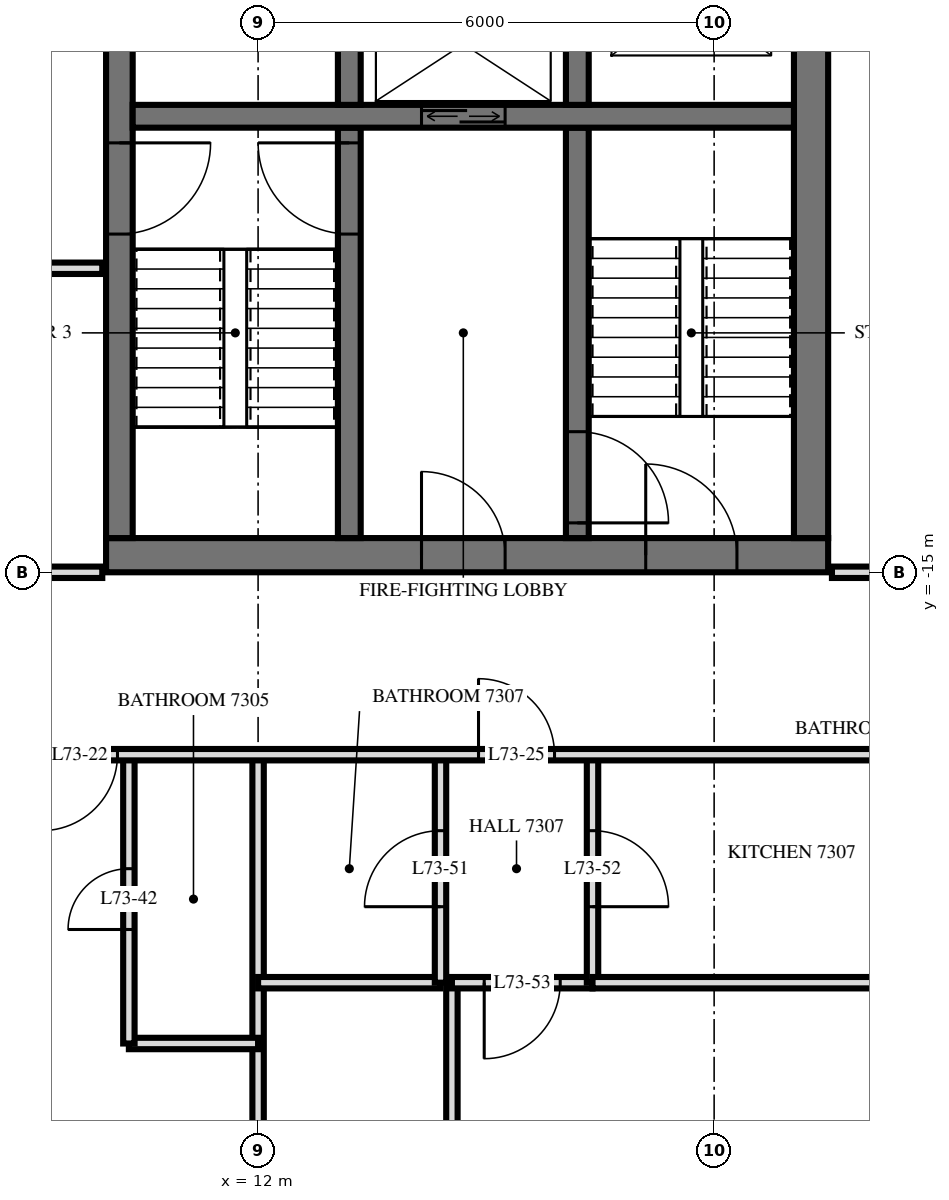
"""IFC4 building model, lengths in metres.
Left out: names, types, materials, properties, quantities, classifications, styles, units other than length and angle.
Written with IfcOpenShell. Run it as: python <this file> out.ifc"""

import sys

from ifc_helpers import new_model, si_unit, direction, frame, frame_2d, origin, place, context, subcontext, project, spatial, rectangle, extrude, element, fill, save


model = new_model("IFC4")
c1 = context("Model", 3, precision=1e-05, world=origin(), true_north=direction((0.0, 1.0)))
c2 = subcontext(c1, "Body", "Model", "MODEL_VIEW")
j1 = project(units=[si_unit("LENGTHUNIT", "METRE"), si_unit("PLANEANGLEUNIT", "RADIAN")], contexts=[c1])
p1 = place(None, origin())
s1 = spatial("IfcSite", under=j1, at=p1, CompositionType="ELEMENT")
p2 = place(p1, origin())
s2 = spatial("IfcBuilding", under=s1, at=p2, CompositionType="ELEMENT")
p3 = place(p2, frame((0.0, 0.0, 277.1)))
s3 = spatial("IfcBuildingStorey", under=s2, at=p3, CompositionType="ELEMENT", Elevation=277.1)
p4 = place(p3, frame((10.0, -14.775, 0.0), z_axis=(0.0, 0.0, 1.0), x_axis=(1.0, 0.0, 0.0)))
e1 = element("IfcWall", 1, at=p4, inside=s3, PredefinedType="SHEAR", context=c2, shape_type="SweptSolid", body=[
    extrude(rectangle(XDim=9.5, YDim=0.45, at=frame_2d((4.75, 0.0))), origin(), (0.0, 0.0, 1.0), 3.5),
])
p5 = place(p4, frame((7.1, 0.0, 0.0)))
e2 = element("IfcOpeningElement", 2, at=p5, cuts=e1, PredefinedType="OPENING", context=c2, shape_type="SweptSolid", body=[
    extrude(rectangle(XDim=1.2, YDim=2.1, at=frame_2d((0.6, 1.05))), frame((0.0, 0.235, 0.0), z_axis=(0.0, -1.0, 0.0), x_axis=(1.0, 0.0, 0.0)), (0.0, 0.0, 1.0), 0.47),
])
p6 = place(p4, frame((4.15, 0.0, 0.0)))
e3 = element("IfcOpeningElement", 3, at=p6, cuts=e1, PredefinedType="OPENING", context=c2, shape_type="SweptSolid", body=[
    extrude(rectangle(XDim=1.1, YDim=2.1, at=frame_2d((0.55, 1.05))), frame((0.0, 0.235, 0.0), z_axis=(0.0, -1.0, 0.0), x_axis=(1.0, 0.0, 0.0)), (0.0, 0.0, 1.0), 0.47),
])
p7 = place(p3, frame((10.175, -14.55, 0.0), z_axis=(0.0, 0.0, 1.0), x_axis=(0.0, 1.0, 0.0)))
e4 = element("IfcWall", 4, at=p7, inside=s3, PredefinedType="SHEAR", context=c2, shape_type="SweptSolid", body=[
    extrude(rectangle(XDim=14.1, YDim=0.35, at=frame_2d((7.05, 0.0))), origin(), (0.0, 0.0, 1.0), 3.5),
])
p8 = place(p7, frame((8.4, 0.0, 0.0)))
e5 = element("IfcOpeningElement", 5, at=p8, cuts=e4, PredefinedType="OPENING", context=c2, shape_type="SweptSolid", body=[
    extrude(rectangle(XDim=1.4, YDim=2.4, at=frame_2d((0.7, 1.2))), frame((0.0, 0.185, 0.0), z_axis=(0.0, -1.0, 0.0), x_axis=(1.0, 0.0, 0.0)), (0.0, 0.0, 1.0), 0.37),
])
p9 = place(p7, frame((10.0, 0.0, 0.0)))
e6 = element("IfcOpeningElement", 6, at=p9, cuts=e4, PredefinedType="OPENING", context=c2, shape_type="SweptSolid", body=[
    extrude(rectangle(XDim=1.4, YDim=2.4, at=frame_2d((0.7, 1.2))), frame((0.0, 0.185, 0.0), z_axis=(0.0, -1.0, 0.0), x_axis=(1.0, 0.0, 0.0)), (0.0, 0.0, 1.0), 0.37),
])
p10 = place(p7, frame((4.0, 0.0, 0.0)))
e7 = element("IfcOpeningElement", 7, at=p10, cuts=e4, PredefinedType="OPENING", context=c2, shape_type="SweptSolid", body=[
    extrude(rectangle(XDim=1.2, YDim=2.1, at=frame_2d((0.6, 1.05))), frame((0.0, 0.185, 0.0), z_axis=(0.0, -1.0, 0.0), x_axis=(1.0, 0.0, 0.0)), (0.0, 0.0, 1.0), 0.37),
])
p11 = place(p3, frame((19.275, -14.55, 0.0), z_axis=(0.0, 0.0, 1.0), x_axis=(0.0, 1.0, 0.0)))
e8 = element("IfcWall", 8, at=p11, inside=s3, PredefinedType="SHEAR", context=c2, shape_type="SweptSolid", body=[
    extrude(rectangle(XDim=14.1, YDim=0.45, at=frame_2d((7.05, 0.0))), origin(), (0.0, 0.0, 1.0), 3.5),
])
p12 = place(p3, frame((10.35, -9.0, 0.0), z_axis=(0.0, 0.0, 1.0), x_axis=(1.0, 0.0, 0.0)))
e9 = element("IfcWall", 9, at=p12, inside=s3, PredefinedType="SHEAR", context=c2, shape_type="SweptSolid", body=[
    extrude(rectangle(XDim=8.7, YDim=0.3, at=frame_2d((4.35, 0.0))), origin(), (0.0, 0.0, 1.0), 3.5),
])
p13 = place(p12, frame((3.8, 0.0, 0.0)))
e10 = element("IfcOpeningElement", 10, at=p13, cuts=e9, PredefinedType="OPENING", context=c2, shape_type="SweptSolid", body=[
    extrude(rectangle(XDim=1.1, YDim=2.1, at=frame_2d((0.55, 1.05))), frame((0.0, 0.16, 0.0), z_axis=(0.0, -1.0, 0.0), x_axis=(1.0, 0.0, 0.0)), (0.0, 0.0, 1.0), 0.32),
])
p14 = place(p3, frame((13.2, -8.85, 0.0), z_axis=(0.0, 0.0, 1.0), x_axis=(0.0, 1.0, 0.0)))
e11 = element("IfcWall", 11, at=p14, inside=s3, PredefinedType="SHEAR", context=c2, shape_type="SweptSolid", body=[
    extrude(rectangle(XDim=2.3, YDim=0.3, at=frame_2d((1.15, 0.0))), origin(), (0.0, 0.0, 1.0), 3.5),
])
p15 = place(p3, frame((13.2, -14.55, 0.0), z_axis=(0.0, 0.0, 1.0), x_axis=(0.0, 1.0, 0.0)))
e12 = element("IfcWall", 12, at=p15, inside=s3, PredefinedType="SHEAR", context=c2, shape_type="SweptSolid", body=[
    extrude(rectangle(XDim=5.4, YDim=0.3, at=frame_2d((2.7, 0.0))), origin(), (0.0, 0.0, 1.0), 3.5),
])
p16 = place(p15, frame((4.0, 0.0, 0.0)))
e13 = element("IfcOpeningElement", 13, at=p16, cuts=e12, PredefinedType="OPENING", context=c2, shape_type="SweptSolid", body=[
    extrude(rectangle(XDim=1.2, YDim=2.1, at=frame_2d((0.6, 1.05))), frame((0.0, 0.16, 0.0), z_axis=(0.0, -1.0, 0.0), x_axis=(1.0, 0.0, 0.0)), (0.0, 0.0, 1.0), 0.32),
])
p17 = place(p3, frame((16.2, -8.85, 0.0), z_axis=(0.0, 0.0, 1.0), x_axis=(0.0, 1.0, 0.0)))
e14 = element("IfcWall", 14, at=p17, inside=s3, PredefinedType="SHEAR", context=c2, shape_type="SweptSolid", body=[
    extrude(rectangle(XDim=2.3, YDim=0.3, at=frame_2d((1.15, 0.0))), origin(), (0.0, 0.0, 1.0), 3.5),
])
p18 = place(p3, frame((16.2, -14.55, 0.0), z_axis=(0.0, 0.0, 1.0), x_axis=(0.0, 1.0, 0.0)))
e15 = element("IfcWall", 15, at=p18, inside=s3, PredefinedType="SHEAR", context=c2, shape_type="SweptSolid", body=[
    extrude(rectangle(XDim=5.4, YDim=0.3, at=frame_2d((2.7, 0.0))), origin(), (0.0, 0.0, 1.0), 3.5),
])
p19 = place(p18, frame((0.2, 0.0, 0.0)))
e16 = element("IfcOpeningElement", 16, at=p19, cuts=e15, PredefinedType="OPENING", context=c2, shape_type="SweptSolid", body=[
    extrude(rectangle(XDim=1.2, YDim=2.1, at=frame_2d((0.6, 1.05))), frame((0.0, 0.16, 0.0), z_axis=(0.0, -1.0, 0.0), x_axis=(1.0, 0.0, 0.0)), (0.0, 0.0, 1.0), 0.32),
])
p20 = place(p3, frame((16.4, -20.4, 0.0), z_axis=(0.0, 0.0, 1.0), x_axis=(0.0, 1.0, 0.0)))
e17 = element("IfcWall", 17, at=p20, inside=s3, PredefinedType="PARTITIONING", context=c2, shape_type="SweptSolid", body=[
    extrude(rectangle(XDim=3.0, YDim=0.15, at=frame_2d((1.5, 0.0))), origin(), (0.0, 0.0, 1.0), 3.22),
])
p21 = place(p20, frame((1.0, 0.0, 0.0)))
e18 = element("IfcOpeningElement", 18, at=p21, cuts=e17, PredefinedType="OPENING", context=c2, shape_type="SweptSolid", body=[
    extrude(rectangle(XDim=1.0, YDim=2.1, at=frame_2d((0.5, 1.05))), frame((0.0, 0.085, 0.0), z_axis=(0.0, -1.0, 0.0), x_axis=(1.0, 0.0, 0.0)), (0.0, 0.0, 1.0), 0.17),
])
p22 = place(p3, frame((14.55, -33.62, 0.0), z_axis=(0.0, 0.0, 1.0), x_axis=(0.0, 1.0, 0.0)))
e19 = element("IfcWall", 19, at=p22, inside=s3, PredefinedType="PARTITIONING", context=c2, shape_type="SweptSolid", body=[
    extrude(rectangle(XDim=13.22, YDim=0.15, at=frame_2d((6.61, 0.0))), origin(), (0.0, 0.0, 1.0), 3.22),
])
p23 = place(p22, frame((6.07, 0.0, 0.0)))
e20 = element("IfcOpeningElement", 20, at=p23, cuts=e19, PredefinedType="OPENING", context=c2, shape_type="SweptSolid", body=[
    extrude(rectangle(XDim=0.9, YDim=2.1, at=frame_2d((0.45, 1.05))), frame((0.0, 0.085, 0.0), z_axis=(0.0, -1.0, 0.0), x_axis=(1.0, 0.0, 0.0)), (0.0, 0.0, 1.0), 0.17),
])
p24 = place(p3, frame((14.4, -20.4, 0.0), z_axis=(0.0, 0.0, 1.0), x_axis=(0.0, 1.0, 0.0)))
e21 = element("IfcWall", 21, at=p24, inside=s3, PredefinedType="PARTITIONING", context=c2, shape_type="SweptSolid", body=[
    extrude(rectangle(XDim=3.0, YDim=0.15, at=frame_2d((1.5, 0.0))), origin(), (0.0, 0.0, 1.0), 3.22),
])
p25 = place(p24, frame((1.0, 0.0, 0.0)))
e22 = element("IfcOpeningElement", 22, at=p25, cuts=e21, PredefinedType="OPENING", context=c2, shape_type="SweptSolid", body=[
    extrude(rectangle(XDim=1.0, YDim=2.1, at=frame_2d((0.5, 1.05))), frame((0.0, 0.085, 0.0), z_axis=(0.0, -1.0, 0.0), x_axis=(1.0, 0.0, 0.0)), (0.0, 0.0, 1.0), 0.17),
])
p26 = place(p3, frame((12.0, -33.62, 0.0), z_axis=(0.0, 0.0, 1.0), x_axis=(0.0, 1.0, 0.0)))
e23 = element("IfcWall", 23, at=p26, inside=s3, PredefinedType="PARTITIONING", context=c2, shape_type="SweptSolid", body=[
    extrude(rectangle(XDim=16.22, YDim=0.15, at=frame_2d((8.11, 0.0))), origin(), (0.0, 0.0, 1.0), 3.22),
])
p27 = place(p3, frame((10.3, -21.2, 0.0), z_axis=(0.0, 0.0, 1.0), x_axis=(0.0, 1.0, 0.0)))
e24 = element("IfcWall", 24, at=p27, inside=s3, PredefinedType="PARTITIONING", context=c2, shape_type="SweptSolid", body=[
    extrude(rectangle(XDim=3.8, YDim=0.15, at=frame_2d((1.9, 0.0))), origin(), (0.0, 0.0, 1.0), 3.22),
])
p28 = place(p27, frame((1.5, 0.0, 0.0)))
e25 = element("IfcOpeningElement", 25, at=p28, cuts=e24, PredefinedType="OPENING", context=c2, shape_type="SweptSolid", body=[
    extrude(rectangle(XDim=0.8, YDim=2.1, at=frame_2d((0.4, 1.05))), frame((0.0, 0.085, 0.0), z_axis=(0.0, -1.0, 0.0), x_axis=(1.0, 0.0, 0.0)), (0.0, 0.0, 1.0), 0.17),
])
p29 = place(p3, frame((10.3, -21.2, 0.0), z_axis=(0.0, 0.0, 1.0), x_axis=(1.0, 0.0, 0.0)))
e26 = element("IfcWall", 26, at=p29, inside=s3, PredefinedType="PARTITIONING", context=c2, shape_type="SweptSolid", body=[
    extrude(rectangle(XDim=1.7, YDim=0.15, at=frame_2d((0.85, 0.0))), origin(), (0.0, 0.0, 1.0), 3.22),
])
p30 = place(p3, frame((14.55, -20.4, 0.0), z_axis=(0.0, 0.0, 1.0), x_axis=(1.0, 0.0, 0.0)))
e27 = element("IfcWall", 27, at=p30, inside=s3, PredefinedType="PARTITIONING", context=c2, shape_type="SweptSolid", body=[
    extrude(rectangle(XDim=1.85, YDim=0.15, at=frame_2d((0.925, 0.0))), origin(), (0.0, 0.0, 1.0), 3.22),
])
p31 = place(p30, frame((0.425, 0.0, 0.0)))
e28 = element("IfcOpeningElement", 28, at=p31, cuts=e27, PredefinedType="OPENING", context=c2, shape_type="SweptSolid", body=[
    extrude(rectangle(XDim=1.0, YDim=2.1, at=frame_2d((0.5, 1.05))), frame((0.0, 0.085, 0.0), z_axis=(0.0, -1.0, 0.0), x_axis=(1.0, 0.0, 0.0)), (0.0, 0.0, 1.0), 0.17),
])
p32 = place(p3, frame((12.0, -20.4, 0.0), z_axis=(0.0, 0.0, 1.0), x_axis=(1.0, 0.0, 0.0)))
e29 = element("IfcWall", 29, at=p32, inside=s3, PredefinedType="PARTITIONING", context=c2, shape_type="SweptSolid", body=[
    extrude(rectangle(XDim=2.4, YDim=0.15, at=frame_2d((1.2, 0.0))), origin(), (0.0, 0.0, 1.0), 3.22),
])
p33 = place(p3, frame((16.4, -20.4, 0.0), z_axis=(0.0, 0.0, 1.0), x_axis=(1.0, 0.0, 0.0)))
e30 = element("IfcWall", 30, at=p33, inside=s3, PredefinedType="PARTITIONING", context=c2, shape_type="SweptSolid", body=[
    extrude(rectangle(XDim=4.15, YDim=0.15, at=frame_2d((2.075, 0.0))), origin(), (0.0, 0.0, 1.0), 3.22),
])
p34 = place(p3, frame((-22.92, -17.4, 0.0), z_axis=(0.0, 0.0, 1.0), x_axis=(1.0, 0.0, 0.0)))
e31 = element("IfcWall", 31, at=p34, inside=s3, PredefinedType="PARTITIONING", context=c2, shape_type="SweptSolid", body=[
    extrude(rectangle(XDim=45.84, YDim=0.15, at=frame_2d((22.92, 0.0))), origin(), (0.0, 0.0, 1.0), 3.22),
])
p35 = place(p34, frame((21.67, 0.0, 0.0)))
e32 = element("IfcOpeningElement", 32, at=p35, cuts=e31, PredefinedType="OPENING", context=c2, shape_type="SweptSolid", body=[
    extrude(rectangle(XDim=1.0, YDim=2.1, at=frame_2d((0.5, 1.05))), frame((0.0, 0.085, 0.0), z_axis=(0.0, -1.0, 0.0), x_axis=(1.0, 0.0, 0.0)), (0.0, 0.0, 1.0), 0.17),
])
p36 = place(p34, frame((24.77, 0.0, 0.0)))
e33 = element("IfcOpeningElement", 33, at=p36, cuts=e31, PredefinedType="OPENING", context=c2, shape_type="SweptSolid", body=[
    extrude(rectangle(XDim=1.0, YDim=2.1, at=frame_2d((0.5, 1.05))), frame((0.0, 0.085, 0.0), z_axis=(0.0, -1.0, 0.0), x_axis=(1.0, 0.0, 0.0)), (0.0, 0.0, 1.0), 0.17),
])
p37 = place(p34, frame((26.07, 0.0, 0.0)))
e34 = element("IfcOpeningElement", 34, at=p37, cuts=e31, PredefinedType="OPENING", context=c2, shape_type="SweptSolid", body=[
    extrude(rectangle(XDim=1.0, YDim=2.1, at=frame_2d((0.5, 1.05))), frame((0.0, 0.085, 0.0), z_axis=(0.0, -1.0, 0.0), x_axis=(1.0, 0.0, 0.0)), (0.0, 0.0, 1.0), 0.17),
])
p38 = place(p34, frame((30.77, 0.0, 0.0)))
e35 = element("IfcOpeningElement", 35, at=p38, cuts=e31, PredefinedType="OPENING", context=c2, shape_type="SweptSolid", body=[
    extrude(rectangle(XDim=1.0, YDim=2.1, at=frame_2d((0.5, 1.05))), frame((0.0, 0.085, 0.0), z_axis=(0.0, -1.0, 0.0), x_axis=(1.0, 0.0, 0.0)), (0.0, 0.0, 1.0), 0.17),
])
p39 = place(p34, frame((32.07, 0.0, 0.0)))
e36 = element("IfcOpeningElement", 36, at=p39, cuts=e31, PredefinedType="OPENING", context=c2, shape_type="SweptSolid", body=[
    extrude(rectangle(XDim=1.0, YDim=2.1, at=frame_2d((0.5, 1.05))), frame((0.0, 0.085, 0.0), z_axis=(0.0, -1.0, 0.0), x_axis=(1.0, 0.0, 0.0)), (0.0, 0.0, 1.0), 0.17),
])
p40 = place(p34, frame((9.42, 0.0, 0.0)))
e37 = element("IfcOpeningElement", 37, at=p40, cuts=e31, PredefinedType="OPENING", context=c2, shape_type="SweptSolid", body=[
    extrude(rectangle(XDim=1.0, YDim=2.1, at=frame_2d((0.5, 1.05))), frame((0.0, 0.085, 0.0), z_axis=(0.0, -1.0, 0.0), x_axis=(1.0, 0.0, 0.0)), (0.0, 0.0, 1.0), 0.17),
])
p41 = place(p34, frame((2.67, 0.0, 0.0)))
e38 = element("IfcOpeningElement", 38, at=p41, cuts=e31, PredefinedType="OPENING", context=c2, shape_type="SweptSolid", body=[
    extrude(rectangle(XDim=1.0, YDim=2.1, at=frame_2d((0.5, 1.05))), frame((0.0, 0.085, 0.0), z_axis=(0.0, -1.0, 0.0), x_axis=(1.0, 0.0, 0.0)), (0.0, 0.0, 1.0), 0.17),
])
p42 = place(p34, frame((37.82, 0.0, 0.0)))
e39 = element("IfcOpeningElement", 39, at=p42, cuts=e31, PredefinedType="OPENING", context=c2, shape_type="SweptSolid", body=[
    extrude(rectangle(XDim=1.0, YDim=2.1, at=frame_2d((0.5, 1.05))), frame((0.0, 0.085, 0.0), z_axis=(0.0, -1.0, 0.0), x_axis=(1.0, 0.0, 0.0)), (0.0, 0.0, 1.0), 0.17),
])
p43 = place(p3, frame((-9.95, -15.0, 0.0), z_axis=(0.0, 0.0, 1.0), x_axis=(1.0, 0.0, 0.0)))
e40 = element("IfcWall", 40, at=p43, inside=s3, PredefinedType="PARTITIONING", context=c2, shape_type="SweptSolid", body=[
    extrude(rectangle(XDim=19.9, YDim=0.15, at=frame_2d((9.95, 0.0))), origin(), (0.0, 0.0, 1.0), 2.584),
])
p44 = place(p43, frame((9.45, 0.0, 0.0)))
e41 = element("IfcOpeningElement", 41, at=p44, cuts=e40, PredefinedType="OPENING", context=c2, shape_type="SweptSolid", body=[
    extrude(rectangle(XDim=1.0, YDim=2.1, at=frame_2d((0.5, 1.05))), frame((0.0, 0.085, 0.0), z_axis=(0.0, -1.0, 0.0), x_axis=(1.0, 0.0, 0.0)), (0.0, 0.0, 1.0), 0.17),
])
p45 = place(p3, frame((19.55, -15.0, 0.0), z_axis=(0.0, 0.0, 1.0), x_axis=(1.0, 0.0, 0.0)))
e42 = element("IfcWall", 42, at=p45, inside=s3, PredefinedType="PARTITIONING", context=c2, shape_type="SweptSolid", body=[
    extrude(rectangle(XDim=3.37, YDim=0.15, at=frame_2d((1.685, 0.0))), origin(), (0.0, 0.0, 1.0), 3.22),
])
p46 = place(p45, frame((0.9, 0.0, 0.0)))
e43 = element("IfcOpeningElement", 43, at=p46, cuts=e42, PredefinedType="OPENING", context=c2, shape_type="SweptSolid", body=[
    extrude(rectangle(XDim=1.0, YDim=2.1, at=frame_2d((0.5, 1.05))), frame((0.0, 0.085, 0.0), z_axis=(0.0, -1.0, 0.0), x_axis=(1.0, 0.0, 0.0)), (0.0, 0.0, 1.0), 0.17),
])
p47 = place(p3, frame((-9.95, -11.0, 0.0), z_axis=(0.0, 0.0, 1.0), x_axis=(1.0, 0.0, 0.0)))
e44 = element("IfcWall", 44, at=p47, inside=s3, PredefinedType="PARTITIONING", context=c2, shape_type="SweptSolid", body=[
    extrude(rectangle(XDim=19.9, YDim=0.15, at=frame_2d((9.95, 0.0))), origin(), (0.0, 0.0, 1.0), 3.22),
])
p48 = place(p47, frame((9.45, 0.0, 0.0)))
e45 = element("IfcOpeningElement", 45, at=p48, cuts=e44, PredefinedType="OPENING", context=c2, shape_type="SweptSolid", body=[
    extrude(rectangle(XDim=1.0, YDim=2.1, at=frame_2d((0.5, 1.05))), frame((0.0, 0.085, 0.0), z_axis=(0.0, -1.0, 0.0), x_axis=(1.0, 0.0, 0.0)), (0.0, 0.0, 1.0), 0.17),
])
p49 = place(p47, frame((15.45, 0.0, 0.0)))
e46 = element("IfcOpeningElement", 46, at=p49, cuts=e44, PredefinedType="OPENING", context=c2, shape_type="SweptSolid", body=[
    extrude(rectangle(XDim=1.0, YDim=2.1, at=frame_2d((0.5, 1.05))), frame((0.0, 0.085, 0.0), z_axis=(0.0, -1.0, 0.0), x_axis=(1.0, 0.0, 0.0)), (0.0, 0.0, 1.0), 0.17),
])
p50 = place(p13, origin())
e47 = element("IfcDoor", 47, at=p50, inside=s3, OperationType="DOUBLE_DOOR_SLIDING", PredefinedType="USERDEFINED", context=c2, shape_type="SweptSolid", body=[
    extrude(rectangle(XDim=1.1, YDim=2.1, at=frame_2d((0.55, 1.05))), frame((0.0, 0.025, 0.0), z_axis=(0.0, -1.0, 0.0), x_axis=(1.0, 0.0, 0.0)), (0.0, 0.0, 1.0), 0.05),
])
fill(e10, e47)
p51 = place(p10, frame((0.6, 0.0, 0.0), z_axis=(0.0, 0.0, 1.0), x_axis=(-1.0, 0.0, 0.0)))
e48 = element("IfcDoor", 48, at=p51, inside=s3, OperationType="SINGLE_SWING_RIGHT", PredefinedType="DOOR", context=c2, shape_type="SweptSolid", body=[
    extrude(rectangle(XDim=1.2, YDim=2.1, at=frame_2d((0.0, 1.05))), frame((0.0, -0.025, 0.0), z_axis=(0.0, 1.0, 0.0), x_axis=(-1.0, 0.0, 0.0)), (0.0, 0.0, 1.0), 0.05),
])
fill(e7, e48)
p52 = place(p5, origin())
e49 = element("IfcDoor", 49, at=p52, inside=s3, OperationType="SINGLE_SWING_RIGHT", PredefinedType="DOOR", context=c2, shape_type="SweptSolid", body=[
    extrude(rectangle(XDim=1.2, YDim=2.1, at=frame_2d((0.6, 1.05))), frame((0.0, 0.025, 0.0), z_axis=(0.0, -1.0, 0.0), x_axis=(1.0, 0.0, 0.0)), (0.0, 0.0, 1.0), 0.05),
])
fill(e2, e49)
p53 = place(p6, origin())
e50 = element("IfcDoor", 50, at=p53, inside=s3, OperationType="SINGLE_SWING_RIGHT", PredefinedType="DOOR", context=c2, shape_type="SweptSolid", body=[
    extrude(rectangle(XDim=1.1, YDim=2.1, at=frame_2d((0.55, 1.05))), frame((0.0, 0.025, 0.0), z_axis=(0.0, -1.0, 0.0), x_axis=(1.0, 0.0, 0.0)), (0.0, 0.0, 1.0), 0.05),
])
fill(e3, e50)
p54 = place(p16, origin())
e51 = element("IfcDoor", 51, at=p54, inside=s3, OperationType="SINGLE_SWING_LEFT", PredefinedType="DOOR", context=c2, shape_type="SweptSolid", body=[
    extrude(rectangle(XDim=1.2, YDim=2.1, at=frame_2d((0.6, 1.05))), frame((0.0, 0.025, 0.0), z_axis=(0.0, -1.0, 0.0), x_axis=(1.0, 0.0, 0.0)), (0.0, 0.0, 1.0), 0.05),
])
fill(e13, e51)
p55 = place(p19, frame((0.6, 0.0, 0.0), z_axis=(0.0, 0.0, 1.0), x_axis=(-1.0, 0.0, 0.0)))
e52 = element("IfcDoor", 52, at=p55, inside=s3, OperationType="SINGLE_SWING_LEFT", PredefinedType="DOOR", context=c2, shape_type="SweptSolid", body=[
    extrude(rectangle(XDim=1.2, YDim=2.1, at=frame_2d((0.0, 1.05))), frame((0.0, -0.025, 0.0), z_axis=(0.0, 1.0, 0.0), x_axis=(-1.0, 0.0, 0.0)), (0.0, 0.0, 1.0), 0.05),
])
fill(e16, e52)
p56 = place(p39, frame((0.5, 0.0, 0.0), z_axis=(0.0, 0.0, 1.0), x_axis=(-1.0, 0.0, 0.0)))
e53 = element("IfcDoor", 53, at=p56, inside=s3, OperationType="SINGLE_SWING_LEFT", PredefinedType="DOOR", context=c2, shape_type="SweptSolid", body=[
    extrude(rectangle(XDim=1.0, YDim=2.1, at=frame_2d((0.0, 1.05))), frame((0.0, -0.025, 0.0), z_axis=(0.0, 1.0, 0.0), x_axis=(-1.0, 0.0, 0.0)), (0.0, 0.0, 1.0), 0.05),
])
fill(e36, e53)
p57 = place(p42, origin())
e54 = element("IfcDoor", 54, at=p57, inside=s3, OperationType="SINGLE_SWING_RIGHT", PredefinedType="DOOR", context=c2, shape_type="SweptSolid", body=[
    extrude(rectangle(XDim=1.0, YDim=2.1, at=frame_2d((0.5, 1.05))), frame((0.0, 0.025, 0.0), z_axis=(0.0, -1.0, 0.0), x_axis=(1.0, 0.0, 0.0)), (0.0, 0.0, 1.0), 0.05),
])
fill(e39, e54)
p58 = place(p28, origin())
e55 = element("IfcDoor", 55, at=p58, inside=s3, OperationType="SINGLE_SWING_RIGHT", PredefinedType="DOOR", context=c2, shape_type="SweptSolid", body=[
    extrude(rectangle(XDim=0.8, YDim=2.1, at=frame_2d((0.4, 1.05))), frame((0.0, 0.025, 0.0), z_axis=(0.0, -1.0, 0.0), x_axis=(1.0, 0.0, 0.0)), (0.0, 0.0, 1.0), 0.05),
])
fill(e25, e55)
p59 = place(p25, origin())
e56 = element("IfcDoor", 56, at=p59, inside=s3, OperationType="SINGLE_SWING_RIGHT", PredefinedType="DOOR", context=c2, shape_type="SweptSolid", body=[
    extrude(rectangle(XDim=1.0, YDim=2.1, at=frame_2d((0.5, 1.05))), frame((0.0, 0.025, 0.0), z_axis=(0.0, -1.0, 0.0), x_axis=(1.0, 0.0, 0.0)), (0.0, 0.0, 1.0), 0.05),
])
fill(e22, e56)
p60 = place(p21, frame((0.5, 0.0, 0.0), z_axis=(0.0, 0.0, 1.0), x_axis=(-1.0, 0.0, 0.0)))
e57 = element("IfcDoor", 57, at=p60, inside=s3, OperationType="SINGLE_SWING_LEFT", PredefinedType="DOOR", context=c2, shape_type="SweptSolid", body=[
    extrude(rectangle(XDim=1.0, YDim=2.1, at=frame_2d((0.0, 1.05))), frame((0.0, -0.025, 0.0), z_axis=(0.0, 1.0, 0.0), x_axis=(-1.0, 0.0, 0.0)), (0.0, 0.0, 1.0), 0.05),
])
fill(e18, e57)
p61 = place(p31, frame((0.5, 0.0, 0.0), z_axis=(0.0, 0.0, 1.0), x_axis=(-1.0, 0.0, 0.0)))
e58 = element("IfcDoor", 58, at=p61, inside=s3, OperationType="SINGLE_SWING_LEFT", PredefinedType="DOOR", context=c2, shape_type="SweptSolid", body=[
    extrude(rectangle(XDim=1.0, YDim=2.1, at=frame_2d((0.0, 1.05))), frame((0.0, -0.025, 0.0), z_axis=(0.0, 1.0, 0.0), x_axis=(-1.0, 0.0, 0.0)), (0.0, 0.0, 1.0), 0.05),
])
fill(e28, e58)
save(model, sys.argv[1])
